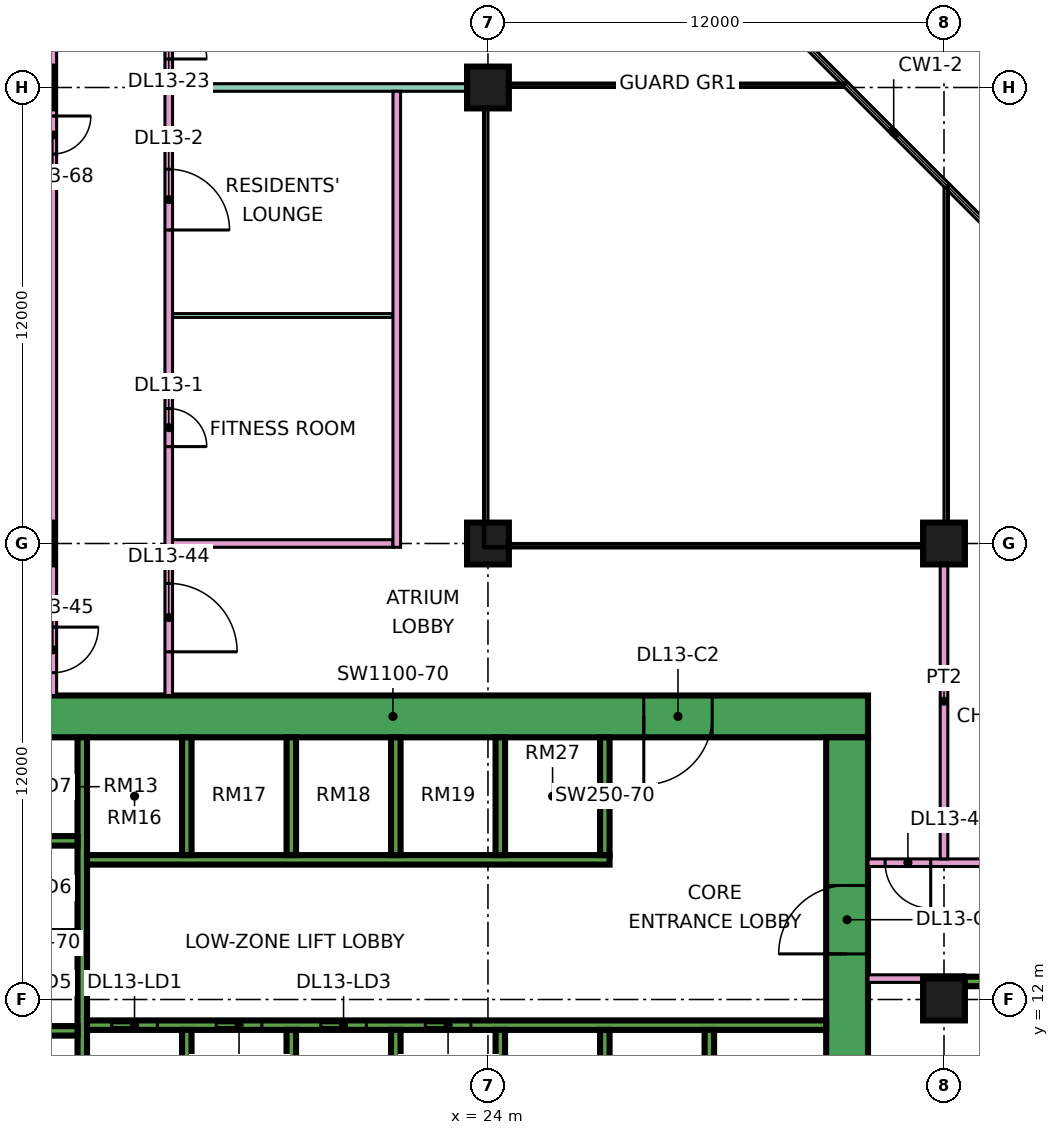
"""IFC4 building model, lengths in metres.
Left out: names, types, materials, properties, quantities, classifications, styles, units other than length and angle.
Written with IfcOpenShell. Run it as: python <this file> out.ifc"""

import sys

from ifc_helpers import new_model, si_unit, direction, frame, frame_2d, origin, origin_2d, place, context, subcontext, project, spatial, rectangle, extrude, element, fill, save


model = new_model("IFC4")
c1 = context("Model", 3, precision=1e-05, world=origin(), true_north=direction((0.0, 1.0)))
c2 = subcontext(c1, "Body", "Model", "MODEL_VIEW")
j1 = project(units=[si_unit("LENGTHUNIT", "METRE"), si_unit("PLANEANGLEUNIT", "RADIAN")], contexts=[c1])
p1 = place(None, origin())
s1 = spatial("IfcSite", under=j1, at=p1, CompositionType="ELEMENT")
p2 = place(p1, origin())
s2 = spatial("IfcBuilding", under=s1, at=p2, CompositionType="ELEMENT")
p3 = place(p2, frame((0.0, 0.0, 63.9)))
s3 = spatial("IfcBuildingStorey", under=s2, at=p3, CompositionType="ELEMENT", Elevation=63.9)
for number, where, z_axis, x_axis in (
    (1, (12.0, 24.0, 0.0), (0.0, 0.0, 1.0), (1.0, 0.0, 0.0)),
    (2, (12.0, 36.0, 0.0), (0.0, 0.0, 1.0), (1.0, 0.0, 0.0)),
    (3, (24.0, 24.0, 0.0), (0.0, 0.0, 1.0), (1.0, 0.0, 0.0)),
    (4, (24.0, 36.0, 0.0), (0.0, 0.0, 1.0), (1.0, 0.0, 0.0)),
    (5, (36.0, 12.0, 0.0), (0.0, 0.0, 1.0), (1.0, 0.0, 0.0)),
    (6, (36.0, 24.0, 0.0), (0.0, 0.0, 1.0), (1.0, 0.0, 0.0)),
):
    element("IfcColumn", number, at=place(p3, frame(where, z_axis=z_axis, x_axis=x_axis)), inside=s3, PredefinedType="COLUMN", context=c2, shape_type="SweptSolid", body=[
        extrude(rectangle(XDim=1.1, YDim=1.1, at=origin_2d()), origin(), (0.0, 0.0, 1.0), 3.75),
    ])
p4 = place(p3, frame((9.0, 19.45, 0.0), z_axis=(0.0, 0.0, 1.0), x_axis=(1.0, 0.0, 0.0)))
e7 = element("IfcWall", 7, at=p4, inside=s3, PredefinedType="SHEAR", context=c2, shape_type="SweptSolid", body=[
    extrude(rectangle(XDim=25.0, YDim=1.1, at=frame_2d((12.5, 0.0))), origin(), (0.0, 0.0, 1.0), 3.75),
])
p5 = place(p4, frame((19.1, 0.0, 0.0)))
e8 = element("IfcOpeningElement", 8, at=p5, cuts=e7, PredefinedType="OPENING", context=c2, shape_type="SweptSolid", body=[
    extrude(rectangle(XDim=1.8, YDim=2.4, at=frame_2d((0.9, 1.2))), frame((0.0, 0.56, 0.0), z_axis=(0.0, -1.0, 0.0), x_axis=(1.0, 0.0, 0.0)), (0.0, 0.0, 1.0), 1.12),
])
p6 = place(p3, frame((33.45, 8.1, 0.0), z_axis=(0.0, 0.0, 1.0), x_axis=(0.0, 1.0, 0.0)))
e9 = element("IfcWall", 9, at=p6, inside=s3, PredefinedType="SHEAR", context=c2, shape_type="SweptSolid", body=[
    extrude(rectangle(XDim=10.8, YDim=1.1, at=frame_2d((5.4, 0.0))), origin(), (0.0, 0.0, 1.0), 3.75),
])
p7 = place(p6, frame((5.1, 0.0, 0.0)))
e10 = element("IfcOpeningElement", 10, at=p7, cuts=e9, PredefinedType="OPENING", context=c2, shape_type="SweptSolid", body=[
    extrude(rectangle(XDim=1.8, YDim=2.4, at=frame_2d((0.9, 1.2))), frame((0.0, 0.56, 0.0), z_axis=(0.0, -1.0, 0.0), x_axis=(1.0, 0.0, 0.0)), (0.0, 0.0, 1.0), 1.12),
])
p8 = place(p3, frame((13.325, 8.1, 0.0), z_axis=(0.0, 0.0, 1.0), x_axis=(0.0, 1.0, 0.0)))
e11 = element("IfcWall", 11, at=p8, inside=s3, PredefinedType="SHEAR", context=c2, shape_type="SweptSolid", body=[
    extrude(rectangle(XDim=10.8, YDim=0.25, at=frame_2d((5.4, 0.0))), origin(), (0.0, 0.0, 1.0), 3.75),
])
p9 = place(p3, frame((13.45, 11.325, 0.0), z_axis=(0.0, 0.0, 1.0), x_axis=(1.0, 0.0, 0.0)))
e12 = element("IfcWall", 12, at=p9, inside=s3, PredefinedType="SHEAR", context=c2, shape_type="SweptSolid", body=[
    extrude(rectangle(XDim=19.45, YDim=0.25, at=frame_2d((9.725, 0.0))), origin(), (0.0, 0.0, 1.0), 3.75),
])
p10 = place(p9, frame((0.65, 0.0, 0.0)))
e13 = element("IfcOpeningElement", 13, at=p10, cuts=e12, PredefinedType="OPENING", context=c2, shape_type="SweptSolid", body=[
    extrude(rectangle(XDim=1.2, YDim=2.2, at=frame_2d((0.6, 1.1))), frame((0.0, 0.135, 0.0), z_axis=(0.0, -1.0, 0.0), x_axis=(1.0, 0.0, 0.0)), (0.0, 0.0, 1.0), 0.27),
])
p11 = place(p9, frame((3.4, 0.0, 0.0)))
e14 = element("IfcOpeningElement", 14, at=p11, cuts=e12, PredefinedType="OPENING", context=c2, shape_type="SweptSolid", body=[
    extrude(rectangle(XDim=1.2, YDim=2.2, at=frame_2d((0.6, 1.1))), frame((0.0, 0.135, 0.0), z_axis=(0.0, -1.0, 0.0), x_axis=(1.0, 0.0, 0.0)), (0.0, 0.0, 1.0), 0.27),
])
p12 = place(p9, frame((6.15, 0.0, 0.0)))
e15 = element("IfcOpeningElement", 15, at=p12, cuts=e12, PredefinedType="OPENING", context=c2, shape_type="SweptSolid", body=[
    extrude(rectangle(XDim=1.2, YDim=2.2, at=frame_2d((0.6, 1.1))), frame((0.0, 0.135, 0.0), z_axis=(0.0, -1.0, 0.0), x_axis=(1.0, 0.0, 0.0)), (0.0, 0.0, 1.0), 0.27),
])
p13 = place(p9, frame((8.9, 0.0, 0.0)))
e16 = element("IfcOpeningElement", 16, at=p13, cuts=e12, PredefinedType="OPENING", context=c2, shape_type="SweptSolid", body=[
    extrude(rectangle(XDim=1.2, YDim=2.2, at=frame_2d((0.6, 1.1))), frame((0.0, 0.135, 0.0), z_axis=(0.0, -1.0, 0.0), x_axis=(1.0, 0.0, 0.0)), (0.0, 0.0, 1.0), 0.27),
])
p14 = place(p3, frame((13.45, 15.675, 0.0), z_axis=(0.0, 0.0, 1.0), x_axis=(1.0, 0.0, 0.0)))
e17 = element("IfcWall", 17, at=p14, inside=s3, PredefinedType="SHEAR", context=c2, shape_type="SweptSolid", body=[
    extrude(rectangle(XDim=13.75, YDim=0.25, at=frame_2d((6.875, 0.0))), origin(), (0.0, 0.0, 1.0), 3.75),
])
for number, where, z_axis, x_axis in (
    (18, (10.2, 11.175, 0.0), (0.0, 0.0, 1.0), (1.0, 0.0, 0.0)),
    (19, (10.2, 13.675, 0.0), (0.0, 0.0, 1.0), (1.0, 0.0, 0.0)),
    (20, (10.2, 16.175, 0.0), (0.0, 0.0, 1.0), (1.0, 0.0, 0.0)),
):
    element("IfcWall", number, at=place(p3, frame(where, z_axis=z_axis, x_axis=x_axis)), inside=s3, PredefinedType="SHEAR", context=c2, shape_type="SweptSolid", body=[
        extrude(rectangle(XDim=3.0, YDim=0.25, at=frame_2d((1.5, 0.0))), origin(), (0.0, 0.0, 1.0), 3.75),
    ])
for number, where, z_axis, x_axis in (
    (21, (16.075, 8.1, 0.0), (0.0, 0.0, 1.0), (0.0, 1.0, 0.0)),
    (22, (18.825, 8.1, 0.0), (0.0, 0.0, 1.0), (0.0, 1.0, 0.0)),
    (23, (21.575, 8.1, 0.0), (0.0, 0.0, 1.0), (0.0, 1.0, 0.0)),
    (24, (24.325, 8.1, 0.0), (0.0, 0.0, 1.0), (0.0, 1.0, 0.0)),
    (25, (27.075, 8.1, 0.0), (0.0, 0.0, 1.0), (0.0, 1.0, 0.0)),
    (26, (29.825, 8.1, 0.0), (0.0, 0.0, 1.0), (0.0, 1.0, 0.0)),
    (27, (16.075, 15.8, 0.0), (0.0, 0.0, 1.0), (0.0, 1.0, 0.0)),
    (28, (18.825, 15.8, 0.0), (0.0, 0.0, 1.0), (0.0, 1.0, 0.0)),
    (29, (21.575, 15.8, 0.0), (0.0, 0.0, 1.0), (0.0, 1.0, 0.0)),
    (30, (24.325, 15.8, 0.0), (0.0, 0.0, 1.0), (0.0, 1.0, 0.0)),
    (31, (27.075, 15.8, 0.0), (0.0, 0.0, 1.0), (0.0, 1.0, 0.0)),
):
    element("IfcWall", number, at=place(p3, frame(where, z_axis=z_axis, x_axis=x_axis)), inside=s3, PredefinedType="SHEAR", context=c2, shape_type="SweptSolid", body=[
        extrude(rectangle(XDim=3.1, YDim=0.25, at=frame_2d((1.55, 0.0))), origin(), (0.0, 0.0, 1.0), 3.75),
    ])
p15 = place(p3, frame((36.55, 12.475, 0.0), z_axis=(0.0, 0.0, 1.0), x_axis=(1.0, 0.0, 0.0)))
e32 = element("IfcWall", 32, at=p15, inside=s3, PredefinedType="SHEAR", context=c2, shape_type="SweptSolid", body=[
    extrude(rectangle(XDim=4.1, YDim=0.25, at=frame_2d((2.05, 0.0))), origin(), (0.0, 0.0, 1.0), 3.75),
])
p16 = place(p15, frame((1.825, 0.0, 0.0)))
e33 = element("IfcOpeningElement", 33, at=p16, cuts=e32, PredefinedType="OPENING", context=c2, shape_type="SweptSolid", body=[
    extrude(rectangle(XDim=1.1, YDim=2.2, at=frame_2d((0.55, 1.1))), frame((0.0, 0.135, 0.0), z_axis=(0.0, -1.0, 0.0), x_axis=(1.0, 0.0, 0.0)), (0.0, 0.0, 1.0), 0.27),
])
p17 = place(p3, frame((-1.447, 12.553, 0.0), z_axis=(0.0, 0.0, 1.0), x_axis=(0.707106781187, -0.707106781187, 0.0)))
e34 = element("IfcWall", 34, at=p17, inside=s3, PredefinedType="SOLIDWALL", context=c2, shape_type="SweptSolid", body=[
    extrude(rectangle(XDim=19.799, YDim=0.15, at=frame_2d((9.899, 0.0))), origin(), (0.0, 0.0, 1.0), 3.35),
])
p18 = place(p17, frame((2.212, 0.0, 0.45)))
e35 = element("IfcOpeningElement", 35, at=p18, cuts=e34, PredefinedType="OPENING", context=c2, shape_type="SweptSolid", body=[
    extrude(rectangle(XDim=3.0, YDim=2.4, at=frame_2d((1.5, 1.2))), frame((0.0, 0.085, 0.0), z_axis=(0.0, -1.0, 0.0), x_axis=(1.0, 0.0, 0.0)), (0.0, 0.0, 1.0), 0.17),
])
p19 = place(p17, frame((10.216, 0.0, 0.45)))
e36 = element("IfcOpeningElement", 36, at=p19, cuts=e34, PredefinedType="OPENING", context=c2, shape_type="SweptSolid", body=[
    extrude(rectangle(XDim=3.0, YDim=2.4, at=frame_2d((1.5, 1.2))), frame((0.0, 0.085, 0.0), z_axis=(0.0, -1.0, 0.0), x_axis=(1.0, 0.0, 0.0)), (0.0, 0.0, 1.0), 0.17),
])
p20 = place(p3, frame((12.55, 20.0, 0.0), z_axis=(0.0, 0.0, 1.0), x_axis=(0.0, 1.0, 0.0)))
e37 = element("IfcWall", 37, at=p20, inside=s3, PredefinedType="PARTITIONING", context=c2, shape_type="SweptSolid", body=[
    extrude(rectangle(XDim=43.0, YDim=0.2, at=frame_2d((21.5, 0.0))), origin(), (0.0, 0.0, 1.0), 3.35),
])
p21 = place(p20, frame((25.8, 0.0, 0.0)))
e38 = element("IfcOpeningElement", 38, at=p21, cuts=e37, PredefinedType="OPENING", context=c2, shape_type="SweptSolid", body=[
    extrude(rectangle(XDim=1.0, YDim=2.1, at=frame_2d((0.5, 1.05))), frame((0.0, 0.11, 0.0), z_axis=(0.0, -1.0, 0.0), x_axis=(1.0, 0.0, 0.0)), (0.0, 0.0, 1.0), 0.22),
])
p22 = place(p20, frame((0.6, 0.0, 0.0)))
e39 = element("IfcOpeningElement", 39, at=p22, cuts=e37, PredefinedType="OPENING", context=c2, shape_type="SweptSolid", body=[
    extrude(rectangle(XDim=1.2, YDim=2.1, at=frame_2d((0.6, 1.05))), frame((0.0, 0.11, 0.0), z_axis=(0.0, -1.0, 0.0), x_axis=(1.0, 0.0, 0.0)), (0.0, 0.0, 1.0), 0.22),
])
p23 = place(p20, frame((14.25, 0.0, 0.0)))
e40 = element("IfcOpeningElement", 40, at=p23, cuts=e37, PredefinedType="OPENING", context=c2, shape_type="SweptSolid", body=[
    extrude(rectangle(XDim=1.0, YDim=2.1, at=frame_2d((0.5, 1.05))), frame((0.0, 0.11, 0.0), z_axis=(0.0, -1.0, 0.0), x_axis=(1.0, 0.0, 0.0)), (0.0, 0.0, 1.0), 0.22),
])
p24 = place(p3, frame((15.6, 20.0, 0.0), z_axis=(0.0, 0.0, 1.0), x_axis=(0.0, 1.0, 0.0)))
e41 = element("IfcWall", 41, at=p24, inside=s3, PredefinedType="PARTITIONING", context=c2, shape_type="SweptSolid", body=[
    extrude(rectangle(XDim=27.775, YDim=0.2, at=frame_2d((13.887, 0.0))), origin(), (0.0, 0.0, 1.0), 3.35),
])
p25 = place(p24, frame((6.55, 0.0, 0.0)))
e42 = element("IfcOpeningElement", 42, at=p25, cuts=e41, PredefinedType="OPENING", context=c2, shape_type="SweptSolid", body=[
    extrude(rectangle(XDim=1.0, YDim=2.1, at=frame_2d((0.5, 1.05))), frame((0.0, 0.11, 0.0), z_axis=(0.0, -1.0, 0.0), x_axis=(1.0, 0.0, 0.0)), (0.0, 0.0, 1.0), 0.22),
])
p26 = place(p24, frame((12.25, 0.0, 0.0)))
e43 = element("IfcOpeningElement", 43, at=p26, cuts=e41, PredefinedType="OPENING", context=c2, shape_type="SweptSolid", body=[
    extrude(rectangle(XDim=1.6, YDim=2.1, at=frame_2d((0.8, 1.05))), frame((0.0, 0.11, 0.0), z_axis=(0.0, -1.0, 0.0), x_axis=(1.0, 0.0, 0.0)), (0.0, 0.0, 1.0), 0.22),
])
p27 = place(p24, frame((16.75, 0.0, 0.0)))
e44 = element("IfcOpeningElement", 44, at=p27, cuts=e41, PredefinedType="OPENING", context=c2, shape_type="SweptSolid", body=[
    extrude(rectangle(XDim=1.0, YDim=2.1, at=frame_2d((0.5, 1.05))), frame((0.0, 0.11, 0.0), z_axis=(0.0, -1.0, 0.0), x_axis=(1.0, 0.0, 0.0)), (0.0, 0.0, 1.0), 0.22),
])
p28 = place(p24, frame((1.15, 0.0, 0.0)))
e45 = element("IfcOpeningElement", 45, at=p28, cuts=e41, PredefinedType="OPENING", context=c2, shape_type="SweptSolid", body=[
    extrude(rectangle(XDim=1.8, YDim=2.1, at=frame_2d((0.9, 1.05))), frame((0.0, 0.11, 0.0), z_axis=(0.0, -1.0, 0.0), x_axis=(1.0, 0.0, 0.0)), (0.0, 0.0, 1.0), 0.22),
])
p29 = place(p24, frame((25.9, 0.0, 0.0)))
e46 = element("IfcOpeningElement", 46, at=p29, cuts=e41, PredefinedType="OPENING", context=c2, shape_type="SweptSolid", body=[
    extrude(rectangle(XDim=1.0, YDim=2.1, at=frame_2d((0.5, 1.05))), frame((0.0, 0.11, 0.0), z_axis=(0.0, -1.0, 0.0), x_axis=(1.0, 0.0, 0.0)), (0.0, 0.0, 1.0), 0.22),
])
p30 = place(p3, frame((15.7, 24.0, 0.0), z_axis=(0.0, 0.0, 1.0), x_axis=(1.0, 0.0, 0.0)))
e47 = element("IfcWall", 47, at=p30, inside=s3, PredefinedType="PARTITIONING", context=c2, shape_type="SweptSolid", body=[
    extrude(rectangle(XDim=5.8, YDim=0.2, at=frame_2d((2.9, 0.0))), origin(), (0.0, 0.0, 1.0), 3.35),
])
p31 = place(p3, frame((15.7, 30.0, 0.0), z_axis=(0.0, 0.0, 1.0), x_axis=(1.0, 0.0, 0.0)))
e48 = element("IfcWall", 48, at=p31, inside=s3, PredefinedType="PARTITIONING", context=c2, shape_type="SweptSolid", body=[
    extrude(rectangle(XDim=5.8, YDim=0.1, at=frame_2d((2.9, 0.0))), origin(), (0.0, 0.0, 1.0), 3.35),
])
p32 = place(p3, frame((15.7, 36.0, 0.0), z_axis=(0.0, 0.0, 1.0), x_axis=(1.0, 0.0, 0.0)))
e49 = element("IfcWall", 49, at=p32, inside=s3, PredefinedType="PARTITIONING", context=c2, shape_type="SweptSolid", body=[
    extrude(rectangle(XDim=8.3, YDim=0.2, at=frame_2d((4.15, 0.0))), origin(), (0.0, 0.0, 1.0), 3.35),
])
p33 = place(p3, frame((21.6, 23.9, 0.0), z_axis=(0.0, 0.0, 1.0), x_axis=(0.0, 1.0, 0.0)))
e50 = element("IfcWall", 50, at=p33, inside=s3, PredefinedType="PARTITIONING", context=c2, shape_type="SweptSolid", body=[
    extrude(rectangle(XDim=12.0, YDim=0.2, at=frame_2d((6.0, 0.0))), origin(), (0.0, 0.0, 1.0), 3.35),
])
p34 = place(p3, frame((34.0, 12.55, 0.0), z_axis=(0.0, 0.0, 1.0), x_axis=(1.0, 0.0, 0.0)))
e51 = element("IfcWall", 51, at=p34, inside=s3, PredefinedType="PARTITIONING", context=c2, shape_type="SweptSolid", body=[
    extrude(rectangle(XDim=2.551, YDim=0.2, at=frame_2d((1.275, 0.0))), origin(), (0.0, 0.0, 1.0), 3.35),
])
p35 = place(p3, frame((34.0, 15.6, 0.0), z_axis=(0.0, 0.0, 1.0), x_axis=(1.0, 0.0, 0.0)))
e52 = element("IfcWall", 52, at=p35, inside=s3, PredefinedType="PARTITIONING", context=c2, shape_type="SweptSolid", body=[
    extrude(rectangle(XDim=10.35, YDim=0.2, at=frame_2d((5.175, 0.0))), origin(), (0.0, 0.0, 1.0), 3.35),
])
p36 = place(p35, frame((5.6, 0.0, 0.0)))
e53 = element("IfcOpeningElement", 53, at=p36, cuts=e52, PredefinedType="OPENING", context=c2, shape_type="SweptSolid", body=[
    extrude(rectangle(XDim=1.0, YDim=2.1, at=frame_2d((0.5, 1.05))), frame((0.0, 0.11, 0.0), z_axis=(0.0, -1.0, 0.0), x_axis=(1.0, 0.0, 0.0)), (0.0, 0.0, 1.0), 0.22),
])
p37 = place(p35, frame((0.45, 0.0, 0.0)))
e54 = element("IfcOpeningElement", 54, at=p37, cuts=e52, PredefinedType="OPENING", context=c2, shape_type="SweptSolid", body=[
    extrude(rectangle(XDim=1.2, YDim=2.1, at=frame_2d((0.6, 1.05))), frame((0.0, 0.11, 0.0), z_axis=(0.0, -1.0, 0.0), x_axis=(1.0, 0.0, 0.0)), (0.0, 0.0, 1.0), 0.22),
])
p38 = place(p3, frame((36.0, 15.7, 0.0), z_axis=(0.0, 0.0, 1.0), x_axis=(0.0, 1.0, 0.0)))
e55 = element("IfcWall", 55, at=p38, inside=s3, PredefinedType="PARTITIONING", context=c2, shape_type="SweptSolid", body=[
    extrude(rectangle(XDim=8.3, YDim=0.2, at=frame_2d((4.15, 0.0))), origin(), (0.0, 0.0, 1.0), 3.35),
])
p39 = place(p10, origin())
e56 = element("IfcDoor", 56, at=p39, inside=s3, OperationType="DOUBLE_DOOR_SLIDING", PredefinedType="DOOR", context=c2, shape_type="SweptSolid", body=[
    extrude(rectangle(XDim=1.2, YDim=2.2, at=frame_2d((0.6, 1.1))), frame((0.0, 0.025, 0.0), z_axis=(0.0, -1.0, 0.0), x_axis=(1.0, 0.0, 0.0)), (0.0, 0.0, 1.0), 0.05),
])
fill(e13, e56)
p40 = place(p11, origin())
e57 = element("IfcDoor", 57, at=p40, inside=s3, OperationType="DOUBLE_DOOR_SLIDING", PredefinedType="DOOR", context=c2, shape_type="SweptSolid", body=[
    extrude(rectangle(XDim=1.2, YDim=2.2, at=frame_2d((0.6, 1.1))), frame((0.0, 0.025, 0.0), z_axis=(0.0, -1.0, 0.0), x_axis=(1.0, 0.0, 0.0)), (0.0, 0.0, 1.0), 0.05),
])
fill(e14, e57)
p41 = place(p12, origin())
e58 = element("IfcDoor", 58, at=p41, inside=s3, OperationType="DOUBLE_DOOR_SLIDING", PredefinedType="DOOR", context=c2, shape_type="SweptSolid", body=[
    extrude(rectangle(XDim=1.2, YDim=2.2, at=frame_2d((0.6, 1.1))), frame((0.0, 0.025, 0.0), z_axis=(0.0, -1.0, 0.0), x_axis=(1.0, 0.0, 0.0)), (0.0, 0.0, 1.0), 0.05),
])
fill(e15, e58)
p42 = place(p13, origin())
e59 = element("IfcDoor", 59, at=p42, inside=s3, OperationType="DOUBLE_DOOR_SLIDING", PredefinedType="DOOR", context=c2, shape_type="SweptSolid", body=[
    extrude(rectangle(XDim=1.2, YDim=2.2, at=frame_2d((0.6, 1.1))), frame((0.0, 0.025, 0.0), z_axis=(0.0, -1.0, 0.0), x_axis=(1.0, 0.0, 0.0)), (0.0, 0.0, 1.0), 0.05),
])
fill(e16, e59)
p43 = place(p7, origin())
e60 = element("IfcDoor", 60, at=p43, inside=s3, OperationType="DOUBLE_DOOR_SINGLE_SWING", PredefinedType="DOOR", context=c2, shape_type="SweptSolid", body=[
    extrude(rectangle(XDim=1.8, YDim=2.4, at=frame_2d((0.9, 1.2))), frame((0.0, 0.025, 0.0), z_axis=(0.0, -1.0, 0.0), x_axis=(1.0, 0.0, 0.0)), (0.0, 0.0, 1.0), 0.05),
])
fill(e10, e60)
p44 = place(p5, frame((1.8, 0.0, 0.0), z_axis=(0.0, 0.0, 1.0), x_axis=(-1.0, 0.0, 0.0)))
e61 = element("IfcDoor", 61, at=p44, inside=s3, OperationType="DOUBLE_DOOR_SINGLE_SWING", PredefinedType="DOOR", context=c2, shape_type="SweptSolid", body=[
    extrude(rectangle(XDim=1.8, YDim=2.4, at=frame_2d((0.9, 1.2))), frame((0.0, 0.025, 0.0), z_axis=(0.0, -1.0, 0.0), x_axis=(1.0, 0.0, 0.0)), (0.0, 0.0, 1.0), 0.05),
])
fill(e8, e61)
p45 = place(p25, frame((1.0, 0.0, 0.0), z_axis=(0.0, 0.0, 1.0), x_axis=(-1.0, 0.0, 0.0)))
e62 = element("IfcDoor", 62, at=p45, inside=s3, OperationType="SINGLE_SWING_LEFT", PredefinedType="DOOR", context=c2, shape_type="SweptSolid", body=[
    extrude(rectangle(XDim=1.0, YDim=2.1, at=frame_2d((0.5, 1.05))), frame((0.0, 0.025, 0.0), z_axis=(0.0, -1.0, 0.0), x_axis=(1.0, 0.0, 0.0)), (0.0, 0.0, 1.0), 0.05),
])
fill(e42, e62)
p46 = place(p26, frame((1.6, 0.0, 0.0), z_axis=(0.0, 0.0, 1.0), x_axis=(-1.0, 0.0, 0.0)))
e63 = element("IfcDoor", 63, at=p46, inside=s3, OperationType="DOUBLE_DOOR_SINGLE_SWING", PredefinedType="DOOR", context=c2, shape_type="SweptSolid", body=[
    extrude(rectangle(XDim=1.6, YDim=2.1, at=frame_2d((0.8, 1.05))), frame((0.0, 0.025, 0.0), z_axis=(0.0, -1.0, 0.0), x_axis=(1.0, 0.0, 0.0)), (0.0, 0.0, 1.0), 0.05),
])
fill(e43, e63)
p47 = place(p27, frame((1.0, 0.0, 0.0), z_axis=(0.0, 0.0, 1.0), x_axis=(-1.0, 0.0, 0.0)))
e64 = element("IfcDoor", 64, at=p47, inside=s3, OperationType="SINGLE_SWING_LEFT", PredefinedType="DOOR", context=c2, shape_type="SweptSolid", body=[
    extrude(rectangle(XDim=1.0, YDim=2.1, at=frame_2d((0.5, 1.05))), frame((0.0, 0.025, 0.0), z_axis=(0.0, -1.0, 0.0), x_axis=(1.0, 0.0, 0.0)), (0.0, 0.0, 1.0), 0.05),
])
fill(e44, e64)
p48 = place(p37, origin())
e65 = element("IfcDoor", 65, at=p48, inside=s3, OperationType="SINGLE_SWING_RIGHT", PredefinedType="DOOR", context=c2, shape_type="SweptSolid", body=[
    extrude(rectangle(XDim=1.2, YDim=2.1, at=frame_2d((0.6, 1.05))), frame((0.0, 0.025, 0.0), z_axis=(0.0, -1.0, 0.0), x_axis=(1.0, 0.0, 0.0)), (0.0, 0.0, 1.0), 0.05),
])
fill(e54, e65)
p49 = place(p28, frame((1.8, 0.0, 0.0), z_axis=(0.0, 0.0, 1.0), x_axis=(-1.0, 0.0, 0.0)))
e66 = element("IfcDoor", 66, at=p49, inside=s3, OperationType="DOUBLE_DOOR_SINGLE_SWING", PredefinedType="DOOR", context=c2, shape_type="SweptSolid", body=[
    extrude(rectangle(XDim=1.8, YDim=2.1, at=frame_2d((0.9, 1.05))), frame((0.0, 0.025, 0.0), z_axis=(0.0, -1.0, 0.0), x_axis=(1.0, 0.0, 0.0)), (0.0, 0.0, 1.0), 0.05),
])
fill(e45, e66)
p50 = place(p22, origin())
e67 = element("IfcDoor", 67, at=p50, inside=s3, OperationType="SINGLE_SWING_RIGHT", PredefinedType="DOOR", context=c2, shape_type="SweptSolid", body=[
    extrude(rectangle(XDim=1.2, YDim=2.1, at=frame_2d((0.6, 1.05))), frame((0.0, 0.025, 0.0), z_axis=(0.0, -1.0, 0.0), x_axis=(1.0, 0.0, 0.0)), (0.0, 0.0, 1.0), 0.05),
])
fill(e39, e67)
p51 = place(p23, origin())
e68 = element("IfcDoor", 68, at=p51, inside=s3, OperationType="SINGLE_SWING_RIGHT", PredefinedType="DOOR", context=c2, shape_type="SweptSolid", body=[
    extrude(rectangle(XDim=1.0, YDim=2.1, at=frame_2d((0.5, 1.05))), frame((0.0, 0.025, 0.0), z_axis=(0.0, -1.0, 0.0), x_axis=(1.0, 0.0, 0.0)), (0.0, 0.0, 1.0), 0.05),
])
fill(e40, e68)
save(model, sys.argv[1])
